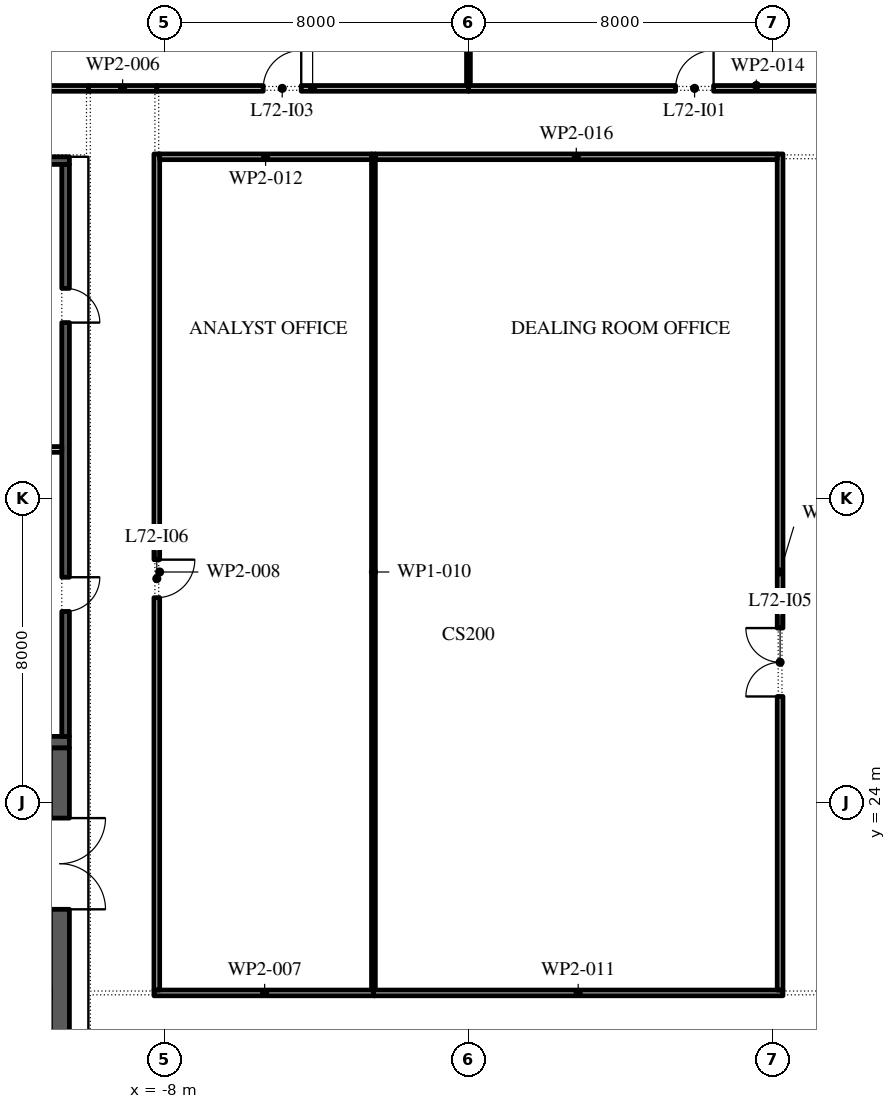
"""IFC4 building model, lengths in metres.
Left out: names, types, materials, properties, quantities, classifications, styles, units other than length and angle.
Written with IfcOpenShell. Run it as: python <this file> out.ifc"""

import sys

from ifc_helpers import new_model, si_unit, direction, frame, frame_2d, origin, place, context, subcontext, project, spatial, rectangle, extrude, element, fill, save


model = new_model("IFC4")
c1 = context("Model", 3, precision=1e-05, world=origin(), true_north=direction((0.0, 1.0)))
c2 = subcontext(c1, "Body", "Model", "MODEL_VIEW")
j1 = project(units=[si_unit("LENGTHUNIT", "METRE"), si_unit("PLANEANGLEUNIT", "RADIAN")], contexts=[c1])
p1 = place(None, origin())
s1 = spatial("IfcSite", under=j1, at=p1, CompositionType="ELEMENT")
p2 = place(p1, origin())
s2 = spatial("IfcBuilding", under=s1, at=p2, CompositionType="ELEMENT")
p3 = place(p2, frame((0.0, 0.0, 330.0)))
s3 = spatial("IfcBuildingStorey", under=s2, at=p3, CompositionType="ELEMENT", Elevation=330.0)
p4 = place(p3, frame((-10.75, -2.45, 0.0), z_axis=(0.0, 0.0, 1.0), x_axis=(0.0, 1.0, 0.0)))
e1 = element("IfcWall", 1, at=p4, inside=s3, PredefinedType="SHEAR", context=c2, shape_type="SweptSolid", body=[
    extrude(rectangle(XDim=27.9, YDim=0.5, at=frame_2d((13.95, 0.0))), origin(), (0.0, 0.0, 1.0), 4.0),
])
p5 = place(p4, frame((23.65, 0.0, 0.0)))
e2 = element("IfcOpeningElement", 2, at=p5, cuts=e1, PredefinedType="OPENING", context=c2, shape_type="SweptSolid", body=[
    extrude(rectangle(XDim=2.4, YDim=2.1, at=frame_2d((1.2, 1.05))), frame((0.0, 0.26, 0.0), z_axis=(0.0, -1.0, 0.0), x_axis=(1.0, 0.0, 0.0)), (0.0, 0.0, 1.0), 0.52),
])
p6 = place(p4, frame((1.087, 0.0, 0.0)))
e3 = element("IfcOpeningElement", 3, at=p6, cuts=e1, PredefinedType="OPENING", context=c2, shape_type="SweptSolid", body=[
    extrude(rectangle(XDim=0.9, YDim=2.1, at=frame_2d((0.45, 1.05))), frame((0.0, 0.26, 0.0), z_axis=(0.0, -1.0, 0.0), x_axis=(1.0, 0.0, 0.0)), (0.0, 0.0, 1.0), 0.52),
])
p7 = place(p4, frame((4.262, 0.0, 0.0)))
e4 = element("IfcOpeningElement", 4, at=p7, cuts=e1, PredefinedType="OPENING", context=c2, shape_type="SweptSolid", body=[
    extrude(rectangle(XDim=1.0, YDim=2.1, at=frame_2d((0.5, 1.05))), frame((0.0, 0.26, 0.0), z_axis=(0.0, -1.0, 0.0), x_axis=(1.0, 0.0, 0.0)), (0.0, 0.0, 1.0), 0.52),
])
p8 = place(p3, frame((-21.5, 25.6, 0.0), z_axis=(0.0, 0.0, 1.0), x_axis=(1.0, 0.0, 0.0)))
e5 = element("IfcWall", 5, at=p8, inside=s3, PredefinedType="SHEAR", context=c2, shape_type="SweptSolid", body=[
    extrude(rectangle(XDim=11.0, YDim=0.3, at=frame_2d((5.5, 0.0))), origin(), (0.0, 0.0, 1.0), 4.0),
])
p9 = place(p3, frame((-10.6, 25.75, 0.0), z_axis=(0.0, 0.0, 1.0), x_axis=(0.0, 1.0, 0.0)))
e6 = element("IfcWall", 6, at=p9, inside=s3, PredefinedType="SHEAR", context=c2, shape_type="SweptSolid", body=[
    extrude(rectangle(XDim=15.05, YDim=0.2, at=frame_2d((7.525, 0.0))), origin(), (0.0, 0.0, 1.0), 4.0),
])
p10 = place(p9, frame((3.288, 0.0, 0.0)))
e7 = element("IfcOpeningElement", 7, at=p10, cuts=e6, PredefinedType="OPENING", context=c2, shape_type="SweptSolid", body=[
    extrude(rectangle(XDim=0.9, YDim=2.1, at=frame_2d((0.45, 1.05))), frame((0.0, 0.11, 0.0), z_axis=(0.0, -1.0, 0.0), x_axis=(1.0, 0.0, 0.0)), (0.0, 0.0, 1.0), 0.22),
])
p11 = place(p9, frame((10.887, 0.0, 0.0)))
e8 = element("IfcOpeningElement", 8, at=p11, cuts=e6, PredefinedType="OPENING", context=c2, shape_type="SweptSolid", body=[
    extrude(rectangle(XDim=0.9, YDim=2.1, at=frame_2d((0.45, 1.05))), frame((0.0, 0.11, 0.0), z_axis=(0.0, -1.0, 0.0), x_axis=(1.0, 0.0, 0.0)), (0.0, 0.0, 1.0), 0.22),
])
p12 = place(p3, frame((-21.5, 40.9, 0.0), z_axis=(0.0, 0.0, 1.0), x_axis=(1.0, 0.0, 0.0)))
e9 = element("IfcWall", 9, at=p12, inside=s3, PredefinedType="SHEAR", context=c2, shape_type="SweptSolid", body=[
    extrude(rectangle(XDim=11.0, YDim=0.2, at=frame_2d((5.5, 0.0))), origin(), (0.0, 0.0, 1.0), 4.0),
])
p13 = place(p3, frame((-16.0, 33.3, 0.0), z_axis=(0.0, 0.0, 1.0), x_axis=(1.0, 0.0, 0.0)))
e10 = element("IfcWall", 10, at=p13, inside=s3, PredefinedType="PARTITIONING", context=c2, shape_type="SweptSolid", body=[
    extrude(rectangle(XDim=5.3, YDim=0.15, at=frame_2d((2.65, 0.0))), origin(), (0.0, 0.0, 1.0), 4.0),
])
p14 = place(p3, frame((-15.1, 42.8, 0.0), z_axis=(0.0, 0.0, 1.0), x_axis=(1.0, 0.0, 0.0)))
e11 = element("IfcWall", 11, at=p14, inside=s3, PredefinedType="PARTITIONING", context=c2, shape_type="SweptSolid", body=[
    extrude(rectangle(XDim=5.1, YDim=0.15, at=frame_2d((2.55, 0.0))), origin(), (0.0, 0.0, 1.0), 4.0),
])
p15 = place(p3, frame((-10.0, 42.8, 0.0), z_axis=(0.0, 0.0, 1.0), x_axis=(1.0, 0.0, 0.0)))
e12 = element("IfcWall", 12, at=p15, inside=s3, PredefinedType="PARTITIONING", context=c2, shape_type="SweptSolid", body=[
    extrude(rectangle(XDim=1.8, YDim=0.15, at=frame_2d((0.9, 0.0))), origin(), (0.0, 0.0, 1.0), 4.0),
])
p16 = place(p3, frame((-8.275, 19.0, 0.0), z_axis=(0.0, 0.0, 1.0), x_axis=(1.0, 0.0, 0.0)))
e13 = element("IfcWall", 13, at=p16, inside=s3, PredefinedType="PARTITIONING", context=c2, shape_type="SweptSolid", body=[
    extrude(rectangle(XDim=5.825, YDim=0.15, at=frame_2d((2.913, 0.0))), origin(), (0.0, 0.0, 1.0), 4.0),
])
p17 = place(p3, frame((-8.2, 41.075, 0.0), z_axis=(0.0, 0.0, 1.0), x_axis=(0.0, -1.0, 0.0)))
e14 = element("IfcWall", 14, at=p17, inside=s3, PredefinedType="PARTITIONING", context=c2, shape_type="SweptSolid", body=[
    extrude(rectangle(XDim=22.0, YDim=0.15, at=frame_2d((11.0, 0.0))), origin(), (0.0, 0.0, 1.0), 4.0),
])
p18 = place(p17, frame((10.675, 0.0, 0.0)))
e15 = element("IfcOpeningElement", 15, at=p18, cuts=e14, PredefinedType="OPENING", context=c2, shape_type="SweptSolid", body=[
    extrude(rectangle(XDim=1.0, YDim=2.1, at=frame_2d((0.5, 1.05))), frame((0.0, 0.085, 0.0), z_axis=(0.0, -1.0, 0.0), x_axis=(1.0, 0.0, 0.0)), (0.0, 0.0, 1.0), 0.17),
])
p19 = place(p3, frame((-8.2, 42.8, 0.0), z_axis=(0.0, 0.0, 1.0), x_axis=(1.0, 0.0, 0.0)))
e16 = element("IfcWall", 16, at=p19, inside=s3, PredefinedType="PARTITIONING", context=c2, shape_type="SweptSolid", body=[
    extrude(rectangle(XDim=8.2, YDim=0.15, at=frame_2d((4.1, 0.0))), origin(), (0.0, 0.0, 1.0), 4.0),
])
p20 = place(p19, frame((2.8, 0.0, 0.0)))
e17 = element("IfcOpeningElement", 17, at=p20, cuts=e16, PredefinedType="OPENING", context=c2, shape_type="SweptSolid", body=[
    extrude(rectangle(XDim=1.0, YDim=2.1, at=frame_2d((0.5, 1.05))), frame((0.0, 0.085, 0.0), z_axis=(0.0, -1.0, 0.0), x_axis=(1.0, 0.0, 0.0)), (0.0, 0.0, 1.0), 0.17),
])
p21 = place(p3, frame((-2.5, 19.075, 0.0), z_axis=(0.0, 0.0, 1.0), x_axis=(0.0, 1.0, 0.0)))
e18 = element("IfcWall", 18, at=p21, inside=s3, PredefinedType="PARTITIONING", context=c2, shape_type="SweptSolid", body=[
    extrude(rectangle(XDim=22.0, YDim=0.1, at=frame_2d((11.0, 0.0))), origin(), (0.0, 0.0, 1.0), 4.0),
])
p22 = place(p3, frame((-2.5, 19.0, 0.0), z_axis=(0.0, 0.0, 1.0), x_axis=(1.0, 0.0, 0.0)))
e19 = element("IfcWall", 19, at=p22, inside=s3, PredefinedType="PARTITIONING", context=c2, shape_type="SweptSolid", body=[
    extrude(rectangle(XDim=10.775, YDim=0.15, at=frame_2d((5.387, 0.0))), origin(), (0.0, 0.0, 1.0), 4.0),
])
p23 = place(p3, frame((-2.55, 41.0, 0.0), z_axis=(0.0, 0.0, 1.0), x_axis=(-1.0, 0.0, 0.0)))
e20 = element("IfcWall", 20, at=p23, inside=s3, PredefinedType="PARTITIONING", context=c2, shape_type="SweptSolid", body=[
    extrude(rectangle(XDim=5.575, YDim=0.15, at=frame_2d((2.788, 0.0))), origin(), (0.0, 0.0, 1.0), 4.0),
])
p24 = place(p3, frame((0.0, 42.875, 0.0), z_axis=(0.0, 0.0, 1.0), x_axis=(0.0, 1.0, 0.0)))
e21 = element("IfcWall", 21, at=p24, inside=s3, PredefinedType="PARTITIONING", context=c2, shape_type="SweptSolid", body=[
    extrude(rectangle(XDim=9.925, YDim=0.1, at=frame_2d((4.962, 0.0))), origin(), (0.0, 0.0, 1.0), 4.0),
])
p25 = place(p3, frame((0.0, 42.8, 0.0), z_axis=(0.0, 0.0, 1.0), x_axis=(1.0, 0.0, 0.0)))
e22 = element("IfcWall", 22, at=p25, inside=s3, PredefinedType="PARTITIONING", context=c2, shape_type="SweptSolid", body=[
    extrude(rectangle(XDim=15.15, YDim=0.15, at=frame_2d((7.575, 0.0))), origin(), (0.0, 0.0, 1.0), 4.0),
])
p26 = place(p25, frame((5.45, 0.0, 0.0)))
e23 = element("IfcOpeningElement", 23, at=p26, cuts=e22, PredefinedType="OPENING", context=c2, shape_type="SweptSolid", body=[
    extrude(rectangle(XDim=1.0, YDim=2.1, at=frame_2d((0.5, 1.05))), frame((0.0, 0.085, 0.0), z_axis=(0.0, -1.0, 0.0), x_axis=(1.0, 0.0, 0.0)), (0.0, 0.0, 1.0), 0.17),
])
p27 = place(p3, frame((8.2, 19.075, 0.0), z_axis=(0.0, 0.0, 1.0), x_axis=(0.0, 1.0, 0.0)))
e24 = element("IfcWall", 24, at=p27, inside=s3, PredefinedType="PARTITIONING", context=c2, shape_type="SweptSolid", body=[
    extrude(rectangle(XDim=22.0, YDim=0.15, at=frame_2d((11.0, 0.0))), origin(), (0.0, 0.0, 1.0), 4.0),
])
p28 = place(p27, frame((7.725, 0.0, 0.0)))
e25 = element("IfcOpeningElement", 25, at=p28, cuts=e24, PredefinedType="OPENING", context=c2, shape_type="SweptSolid", body=[
    extrude(rectangle(XDim=1.8, YDim=2.1, at=frame_2d((0.9, 1.05))), frame((0.0, 0.085, 0.0), z_axis=(0.0, -1.0, 0.0), x_axis=(1.0, 0.0, 0.0)), (0.0, 0.0, 1.0), 0.17),
])
p29 = place(p3, frame((8.125, 41.0, 0.0), z_axis=(0.0, 0.0, 1.0), x_axis=(-1.0, 0.0, 0.0)))
e26 = element("IfcWall", 26, at=p29, inside=s3, PredefinedType="PARTITIONING", context=c2, shape_type="SweptSolid", body=[
    extrude(rectangle(XDim=10.575, YDim=0.15, at=frame_2d((5.288, 0.0))), origin(), (0.0, 0.0, 1.0), 4.0),
])
p30 = place(p5, frame((2.4, 0.0, 0.0), z_axis=(0.0, 0.0, 1.0), x_axis=(-1.0, 0.0, 0.0)))
e27 = element("IfcDoor", 27, at=p30, inside=s3, OperationType="DOUBLE_DOOR_SINGLE_SWING", PredefinedType="DOOR", context=c2, shape_type="SweptSolid", body=[
    extrude(rectangle(XDim=2.4, YDim=2.1, at=frame_2d((1.2, 1.05))), frame((0.0, 0.025, 0.0), z_axis=(0.0, -1.0, 0.0), x_axis=(1.0, 0.0, 0.0)), (0.0, 0.0, 1.0), 0.05),
])
fill(e2, e27)
p31 = place(p10, frame((0.9, 0.15, 0.0), z_axis=(0.0, 0.0, 1.0), x_axis=(-1.0, 0.0, 0.0)))
e28 = element("IfcDoor", 28, at=p31, inside=s3, OperationType="SINGLE_SWING_RIGHT", PredefinedType="DOOR", context=c2, shape_type="SweptSolid", body=[
    extrude(rectangle(XDim=0.9, YDim=2.1, at=frame_2d((0.45, 1.05))), frame((0.0, 0.1, 0.0), z_axis=(0.0, -1.0, 0.0), x_axis=(1.0, 0.0, 0.0)), (0.0, 0.0, 1.0), 0.05),
])
fill(e7, e28)
p32 = place(p11, frame((0.9, 0.15, 0.0), z_axis=(0.0, 0.0, 1.0), x_axis=(-1.0, 0.0, 0.0)))
e29 = element("IfcDoor", 29, at=p32, inside=s3, OperationType="SINGLE_SWING_LEFT", PredefinedType="DOOR", context=c2, shape_type="SweptSolid", body=[
    extrude(rectangle(XDim=0.9, YDim=2.1, at=frame_2d((0.45, 1.05))), frame((0.0, 0.1, 0.0), z_axis=(0.0, -1.0, 0.0), x_axis=(1.0, 0.0, 0.0)), (0.0, 0.0, 1.0), 0.05),
])
fill(e8, e29)
p33 = place(p26, origin())
e30 = element("IfcDoor", 30, at=p33, inside=s3, OperationType="SINGLE_SWING_LEFT", PredefinedType="DOOR", context=c2, shape_type="SweptSolid", body=[
    extrude(rectangle(XDim=1.0, YDim=2.1, at=frame_2d((0.5, 1.05))), frame((0.0, 0.025, 0.0), z_axis=(0.0, -1.0, 0.0), x_axis=(1.0, 0.0, 0.0)), (0.0, 0.0, 1.0), 0.05),
])
fill(e23, e30)
p34 = place(p20, origin())
e31 = element("IfcDoor", 31, at=p34, inside=s3, OperationType="SINGLE_SWING_LEFT", PredefinedType="DOOR", context=c2, shape_type="SweptSolid", body=[
    extrude(rectangle(XDim=1.0, YDim=2.1, at=frame_2d((0.5, 1.05))), frame((0.0, 0.025, 0.0), z_axis=(0.0, -1.0, 0.0), x_axis=(1.0, 0.0, 0.0)), (0.0, 0.0, 1.0), 0.05),
])
fill(e17, e31)
p35 = place(p28, origin())
e32 = element("IfcDoor", 32, at=p35, inside=s3, OperationType="SINGLE_SWING_RIGHT", PredefinedType="DOOR", context=c2, shape_type="SweptSolid", body=[
    extrude(rectangle(XDim=1.8, YDim=2.1, at=frame_2d((0.9, 1.05))), frame((0.0, 0.025, 0.0), z_axis=(0.0, -1.0, 0.0), x_axis=(1.0, 0.0, 0.0)), (0.0, 0.0, 1.0), 0.05),
])
fill(e25, e32)
p36 = place(p18, origin())
e33 = element("IfcDoor", 33, at=p36, inside=s3, OperationType="SINGLE_SWING_RIGHT", PredefinedType="DOOR", context=c2, shape_type="SweptSolid", body=[
    extrude(rectangle(XDim=1.0, YDim=2.1, at=frame_2d((0.5, 1.05))), frame((0.0, 0.025, 0.0), z_axis=(0.0, -1.0, 0.0), x_axis=(1.0, 0.0, 0.0)), (0.0, 0.0, 1.0), 0.05),
])
fill(e15, e33)
save(model, sys.argv[1])
